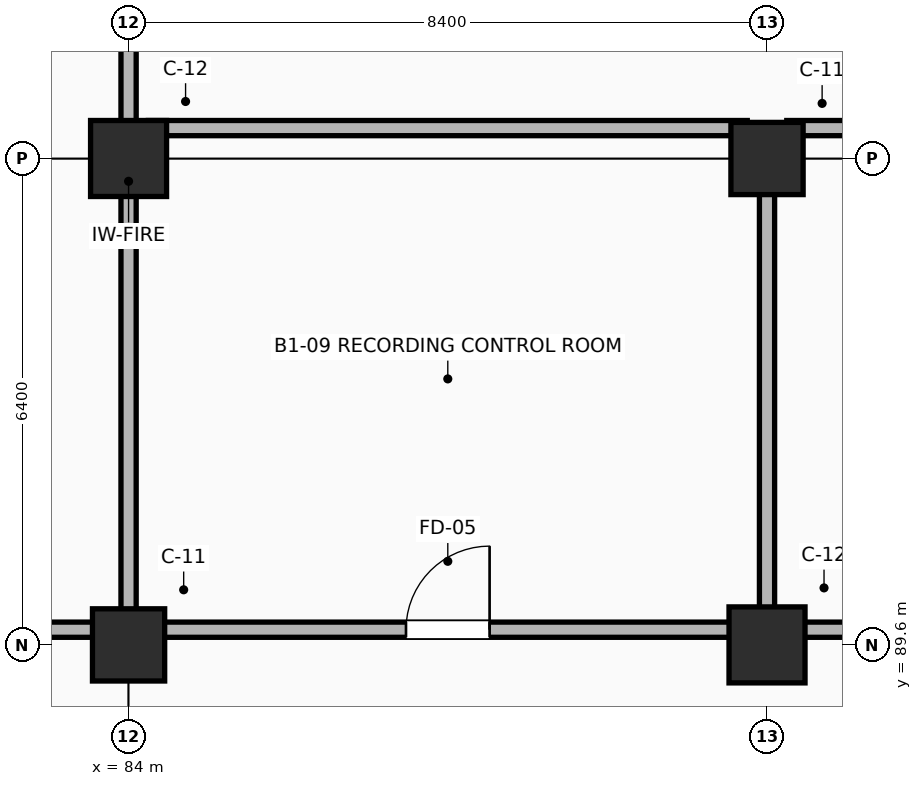
"""IFC4 building model, lengths in metres.
Left out: names, types, materials, properties, quantities, classifications, styles, units other than length and angle.
Written with IfcOpenShell. Run it as: python <this file> out.ifc"""

import sys

from ifc_helpers import new_model, si_unit, direction, frame, frame_2d, origin, origin_2d, place, context, subcontext, project, spatial, rectangle, extrude, element, fill, save


model = new_model("IFC4")
c1 = context("Model", 3, precision=1e-05, world=origin(), true_north=direction((0.0, 1.0)))
c2 = subcontext(c1, "Body", "Model", "MODEL_VIEW")
j1 = project(units=[si_unit("LENGTHUNIT", "METRE"), si_unit("PLANEANGLEUNIT", "RADIAN")], contexts=[c1])
p1 = place(None, origin())
s1 = spatial("IfcSite", under=j1, at=p1, CompositionType="ELEMENT")
p2 = place(p1, origin())
s2 = spatial("IfcBuilding", under=s1, at=p2, CompositionType="ELEMENT")
p3 = place(p2, frame((0.0, 0.0, -4.8)))
s3 = spatial("IfcBuildingStorey", under=s2, at=p3, CompositionType="ELEMENT", Elevation=-4.8)
p4 = place(p3, frame((84.0, 89.6, 0.0), z_axis=(0.0, 0.0, 1.0), x_axis=(1.0, 0.0, 0.0)))
e1 = element("IfcColumn", 1, at=p4, inside=s3, PredefinedType="COLUMN", context=c2, shape_type="SweptSolid", body=[
    extrude(rectangle(XDim=0.95, YDim=0.95, at=origin_2d()), origin(), (0.0, 0.0, 1.0), 4.8),
])
for number, where, z_axis, x_axis in (
    (2, (84.0, 96.0, 0.0), (0.0, 0.0, 1.0), (1.0, 0.0, 0.0)),
    (3, (92.4, 89.6, 0.0), (0.0, 0.0, 1.0), (1.0, 0.0, 0.0)),
):
    element("IfcColumn", number, at=place(p3, frame(where, z_axis=z_axis, x_axis=x_axis)), inside=s3, PredefinedType="COLUMN", context=c2, shape_type="SweptSolid", body=[
        extrude(rectangle(XDim=1.0, YDim=1.0, at=origin_2d()), origin(), (0.0, 0.0, 1.0), 4.8),
    ])
p5 = place(p3, frame((92.4, 96.0, 0.0), z_axis=(0.0, 0.0, 1.0), x_axis=(1.0, 0.0, 0.0)))
e4 = element("IfcColumn", 4, at=p5, inside=s3, PredefinedType="COLUMN", context=c2, shape_type="SweptSolid", body=[
    extrude(rectangle(XDim=0.95, YDim=0.95, at=origin_2d()), origin(), (0.0, 0.0, 1.0), 4.8),
])
p6 = place(p3, frame((67.66, 89.8, 0.0), z_axis=(0.0, 0.0, 1.0), x_axis=(1.0, 0.0, 0.0)))
e5 = element("IfcWall", 5, at=p6, inside=s3, PredefinedType="PARTITIONING", context=c2, shape_type="SweptSolid", body=[
    extrude(rectangle(XDim=16.08, YDim=0.2, at=frame_2d((8.04, 0.0))), origin(), (0.0, 0.0, 1.0), 3.475),
])
p7 = place(p6, frame((9.09, 0.0, 0.0)))
e6 = element("IfcOpeningElement", 6, at=p7, cuts=e5, PredefinedType="OPENING", context=c2, shape_type="SweptSolid", body=[
    extrude(rectangle(XDim=1.1, YDim=2.15, at=frame_2d((0.55, 1.075))), frame((0.0, 0.11, 0.0), z_axis=(0.0, -1.0, 0.0), x_axis=(1.0, 0.0, 0.0)), (0.0, 0.0, 1.0), 0.22),
])
p8 = place(p3, frame((84.0, 90.06, 0.0), z_axis=(0.0, 0.0, 1.0), x_axis=(0.0, 1.0, 0.0)))
e7 = element("IfcWall", 7, at=p8, inside=s3, PredefinedType="PARTITIONING", context=c2, shape_type="SweptSolid", body=[
    extrude(rectangle(XDim=11.28, YDim=0.2, at=frame_2d((5.64, 0.0))), origin(), (0.0, 0.0, 1.0), 3.375),
])
p9 = place(p3, frame((84.26, 89.8, 0.0), z_axis=(0.0, 0.0, 1.0), x_axis=(1.0, 0.0, 0.0)))
e8 = element("IfcWall", 8, at=p9, inside=s3, PredefinedType="PARTITIONING", context=c2, shape_type="SweptSolid", body=[
    extrude(rectangle(XDim=7.88, YDim=0.2, at=frame_2d((3.94, 0.0))), origin(), (0.0, 0.0, 1.0), 3.475),
])
p10 = place(p9, frame((3.39, 0.0, 0.0)))
e9 = element("IfcOpeningElement", 9, at=p10, cuts=e8, PredefinedType="OPENING", context=c2, shape_type="SweptSolid", body=[
    extrude(rectangle(XDim=1.1, YDim=2.15, at=frame_2d((0.55, 1.075))), frame((0.0, 0.11, 0.0), z_axis=(0.0, -1.0, 0.0), x_axis=(1.0, 0.0, 0.0)), (0.0, 0.0, 1.0), 0.22),
])
p11 = place(p3, frame((92.4, 90.06, 0.0), z_axis=(0.0, 0.0, 1.0), x_axis=(0.0, 1.0, 0.0)))
e10 = element("IfcWall", 10, at=p11, inside=s3, PredefinedType="PARTITIONING", context=c2, shape_type="SweptSolid", body=[
    extrude(rectangle(XDim=6.08, YDim=0.2, at=frame_2d((3.04, 0.0))), origin(), (0.0, 0.0, 1.0), 3.375),
])
p12 = place(p3, frame((92.14, 96.4, 0.0), z_axis=(0.0, 0.0, 1.0), x_axis=(-1.0, 0.0, 0.0)))
e11 = element("IfcWall", 11, at=p12, inside=s3, PredefinedType="PARTITIONING", context=c2, shape_type="SweptSolid", body=[
    extrude(rectangle(XDim=7.88, YDim=0.2, at=frame_2d((3.94, 0.0))), origin(), (0.0, 0.0, 1.0), 3.425),
])
p13 = place(p3, frame((92.66, 89.8, 0.0), z_axis=(0.0, 0.0, 1.0), x_axis=(1.0, 0.0, 0.0)))
e12 = element("IfcWall", 12, at=p13, inside=s3, PredefinedType="PARTITIONING", context=c2, shape_type="SweptSolid", body=[
    extrude(rectangle(XDim=7.68, YDim=0.2, at=frame_2d((3.84, 0.0))), origin(), (0.0, 0.0, 1.0), 3.425),
])
p14 = place(p13, frame((3.29, 0.0, 0.0)))
e13 = element("IfcOpeningElement", 13, at=p14, cuts=e12, PredefinedType="OPENING", context=c2, shape_type="SweptSolid", body=[
    extrude(rectangle(XDim=1.1, YDim=2.15, at=frame_2d((0.55, 1.075))), frame((0.0, 0.11, 0.0), z_axis=(0.0, -1.0, 0.0), x_axis=(1.0, 0.0, 0.0)), (0.0, 0.0, 1.0), 0.22),
])
p15 = place(p3, frame((100.34, 96.4, 0.0), z_axis=(0.0, 0.0, 1.0), x_axis=(-1.0, 0.0, 0.0)))
e14 = element("IfcWall", 14, at=p15, inside=s3, PredefinedType="PARTITIONING", context=c2, shape_type="SweptSolid", body=[
    extrude(rectangle(XDim=7.68, YDim=0.2, at=frame_2d((3.84, 0.0))), origin(), (0.0, 0.0, 1.0), 3.425),
])
p16 = place(p10, origin())
e15 = element("IfcDoor", 15, at=p16, inside=s3, OperationType="SINGLE_SWING_RIGHT", PredefinedType="DOOR", context=c2, shape_type="SweptSolid", body=[
    extrude(rectangle(XDim=1.1, YDim=2.15, at=frame_2d((0.55, 1.075))), frame((0.0, 0.025, 0.0), z_axis=(0.0, -1.0, 0.0), x_axis=(1.0, 0.0, 0.0)), (0.0, 0.0, 1.0), 0.05),
])
fill(e9, e15)
save(model, sys.argv[1])
